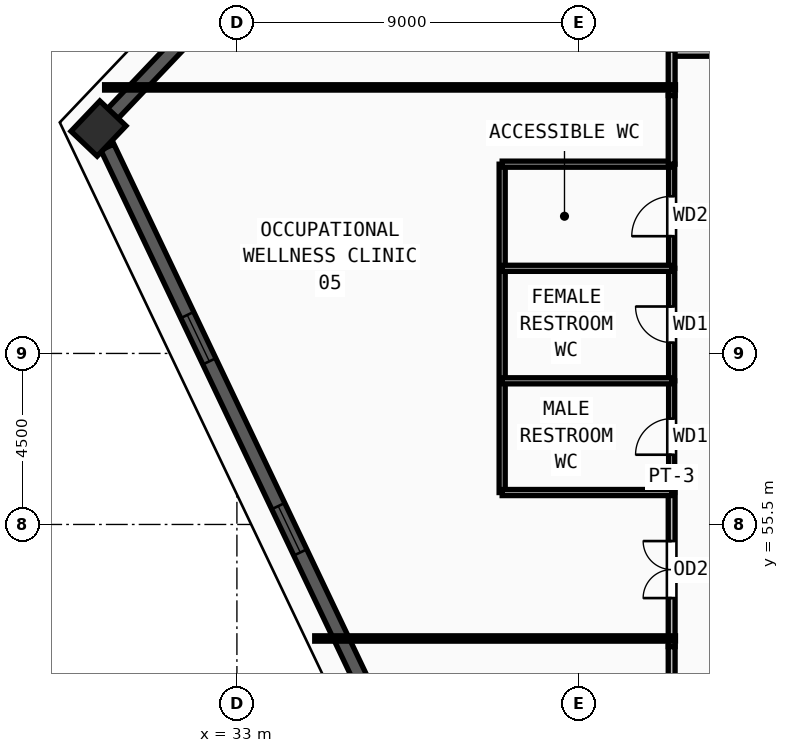
"""IFC4 building model, lengths in metres.
Left out: names, types, materials, properties, quantities, classifications, styles, units other than length and angle.
Written with IfcOpenShell. Run it as: python <this file> out.ifc"""

import sys

from ifc_helpers import new_model, si_unit, direction, frame, frame_2d, origin, origin_2d, place, context, subcontext, project, spatial, rectangle, extrude, source, transform, mapped, element, fill, save


model = new_model("IFC4")
c1 = context("Model", 3, precision=1e-05, world=origin(), true_north=direction((0.0, 1.0)))
c2 = subcontext(c1, "Body", "Model", "MODEL_VIEW")
j1 = project(units=[si_unit("LENGTHUNIT", "METRE"), si_unit("PLANEANGLEUNIT", "RADIAN")], contexts=[c1])
p1 = place(None, origin())
s1 = spatial("IfcSite", under=j1, at=p1, CompositionType="ELEMENT")
p2 = place(p1, origin())
s2 = spatial("IfcBuilding", under=s1, at=p2, CompositionType="ELEMENT")
p3 = place(p2, frame((0.0, 0.0, 286.5)))
s3 = spatial("IfcBuildingStorey", under=s2, at=p3, CompositionType="ELEMENT", Elevation=286.5)
m1 = source(origin(), c2, "Body", "SweptSolid", [
    extrude(rectangle(XDim=1.1, YDim=0.95, at=origin_2d()), origin(), (0.0, 0.0, 1.0), 3.75),
])
p4 = place(p3, frame((29.358, 65.917, 0.0), z_axis=(0.0, 0.0, 1.0), x_axis=(0.68936671806, 0.724412539946, 0.0)))
e1 = element("IfcColumn", 1, at=p4, inside=s3, PredefinedType="COLUMN", context=c2, shape_type="MappedRepresentation", body=[
    mapped(m1, transform((0.0, 0.0, 0.0), x_axis=(1.0, 0.0, 0.0), y_axis=(0.0, 1.0, 0.0), z_axis=(0.0, 0.0, 1.0), scale=1.0)),
])
p5 = place(p3, frame((32.532, 69.253, 0.0), z_axis=(0.0, 0.0, 1.0), x_axis=(-0.689320656659, -0.724456370186, 0.0)))
e2 = element("IfcWall", 2, at=p5, inside=s3, PredefinedType="SOLIDWALL", context=c2, shape_type="SweptSolid", body=[
    extrude(rectangle(XDim=4.065, YDim=0.38, at=frame_2d((2.032, 0.0))), origin(), (0.0, 0.0, 1.0), 3.57),
])
p6 = place(p3, frame((29.59, 65.429, 0.0), z_axis=(0.0, 0.0, 1.0), x_axis=(0.429890605998, -0.902880981567, 0.0)))
e3 = element("IfcWall", 3, at=p6, inside=s3, PredefinedType="SOLIDWALL", context=c2, shape_type="SweptSolid", body=[
    extrude(rectangle(XDim=22.273, YDim=0.38, at=frame_2d((11.136, 0.0))), origin(), (0.0, 0.0, 1.0), 3.57),
])
m2 = source(origin(), c2, "Body", "SweptSolid", [
    extrude(rectangle(XDim=1.35, YDim=1.85, at=frame_2d((0.675, 0.925))), frame((0.0, 0.2, 0.0), z_axis=(0.0, -1.0, 0.0), x_axis=(1.0, 0.0, 0.0)), (0.0, 0.0, 1.0), 0.4),
])
p7 = place(p6, frame((4.893, 0.0, 0.55)))
e4 = element("IfcOpeningElement", 4, at=p7, cuts=e3, PredefinedType="OPENING", context=c2, shape_type="MappedRepresentation", body=[
    mapped(m2, transform((0.0, 0.0, 0.0), x_axis=(1.0, 0.0, 0.0), y_axis=(0.0, 1.0, 0.0), z_axis=(0.0, 0.0, 1.0), scale=1.0)),
])
p8 = place(p6, frame((10.462, 0.0, 0.55)))
e5 = element("IfcOpeningElement", 5, at=p8, cuts=e3, PredefinedType="OPENING", context=c2, shape_type="MappedRepresentation", body=[
    mapped(m2, transform((0.0, 0.0, 0.0), x_axis=(1.0, 0.0, 0.0), y_axis=(0.0, 1.0, 0.0), z_axis=(0.0, 0.0, 1.0), scale=1.0)),
])
p9 = place(p6, frame((16.03, 0.0, 0.55)))
e6 = element("IfcOpeningElement", 6, at=p9, cuts=e3, PredefinedType="OPENING", context=c2, shape_type="MappedRepresentation", body=[
    mapped(m2, transform((0.0, 0.0, 0.0), x_axis=(1.0, 0.0, 0.0), y_axis=(0.0, 1.0, 0.0), z_axis=(0.0, 0.0, 1.0), scale=1.0)),
])
p10 = place(p3, frame((44.44, 56.34, 0.0), z_axis=(0.0, 0.0, 1.0), x_axis=(0.0, 1.0, 0.0)))
e7 = element("IfcWall", 7, at=p10, inside=s3, PredefinedType="PARTITIONING", context=c2, shape_type="SweptSolid", body=[
    extrude(rectangle(XDim=2.94, YDim=0.16, at=frame_2d((1.47, 0.0))), origin(), (0.0, 0.0, 1.0), 3.57),
])
m3 = source(origin(), c2, "Body", "SweptSolid", [
    extrude(rectangle(XDim=0.95, YDim=2.15, at=frame_2d((0.475, 1.075))), frame((0.0, 0.09, 0.0), z_axis=(0.0, -1.0, 0.0), x_axis=(1.0, 0.0, 0.0)), (0.0, 0.0, 1.0), 0.18),
])
p11 = place(p10, frame((0.995, 0.0, 0.0)))
e8 = element("IfcOpeningElement", 8, at=p11, cuts=e7, PredefinedType="OPENING", context=c2, shape_type="MappedRepresentation", body=[
    mapped(m3, transform((0.0, 0.0, 0.0), x_axis=(1.0, 0.0, 0.0), y_axis=(0.0, 1.0, 0.0), z_axis=(0.0, 0.0, 1.0), scale=1.0)),
])
p12 = place(p3, frame((44.44, 59.28, 0.0), z_axis=(0.0, 0.0, 1.0), x_axis=(0.0, 1.0, 0.0)))
e9 = element("IfcWall", 9, at=p12, inside=s3, PredefinedType="PARTITIONING", context=c2, shape_type="SweptSolid", body=[
    extrude(rectangle(XDim=2.96, YDim=0.16, at=frame_2d((1.48, 0.0))), origin(), (0.0, 0.0, 1.0), 3.57),
])
p13 = place(p12, frame((1.005, 0.0, 0.0)))
e10 = element("IfcOpeningElement", 10, at=p13, cuts=e9, PredefinedType="OPENING", context=c2, shape_type="MappedRepresentation", body=[
    mapped(m3, transform((0.0, 0.0, 0.0), x_axis=(1.0, 0.0, 0.0), y_axis=(0.0, 1.0, 0.0), z_axis=(0.0, 0.0, 1.0), scale=1.0)),
])
p14 = place(p3, frame((44.44, 62.24, 0.0), z_axis=(0.0, 0.0, 1.0), x_axis=(0.0, 1.0, 0.0)))
e11 = element("IfcWall", 11, at=p14, inside=s3, PredefinedType="PARTITIONING", context=c2, shape_type="SweptSolid", body=[
    extrude(rectangle(XDim=2.74, YDim=0.16, at=frame_2d((1.37, 0.0))), origin(), (0.0, 0.0, 1.0), 3.57),
])
m4 = source(origin(), c2, "Body", "SweptSolid", [
    extrude(rectangle(XDim=1.05, YDim=2.15, at=frame_2d((0.525, 1.075))), frame((0.0, 0.09, 0.0), z_axis=(0.0, -1.0, 0.0), x_axis=(1.0, 0.0, 0.0)), (0.0, 0.0, 1.0), 0.18),
])
p15 = place(p14, frame((0.845, 0.0, 0.0)))
e12 = element("IfcOpeningElement", 12, at=p15, cuts=e11, PredefinedType="OPENING", context=c2, shape_type="MappedRepresentation", body=[
    mapped(m4, transform((0.0, 0.0, 0.0), x_axis=(1.0, 0.0, 0.0), y_axis=(0.0, 1.0, 0.0), z_axis=(0.0, 0.0, 1.0), scale=1.0)),
])
p16 = place(p3, frame((44.44, 52.285, 0.0), z_axis=(0.0, 0.0, 1.0), x_axis=(0.0, 1.0, 0.0)))
e13 = element("IfcWall", 13, at=p16, inside=s3, PredefinedType="PARTITIONING", context=c2, shape_type="SweptSolid", body=[
    extrude(rectangle(XDim=4.055, YDim=0.18, at=frame_2d((2.028, 0.0))), origin(), (0.0, 0.0, 1.0), 3.261),
])
m5 = source(origin(), c2, "Body", "SweptSolid", [
    extrude(rectangle(XDim=1.5, YDim=2.2, at=frame_2d((0.75, 1.1))), frame((0.0, 0.1, 0.0), z_axis=(0.0, -1.0, 0.0), x_axis=(1.0, 0.0, 0.0)), (0.0, 0.0, 1.0), 0.2),
])
p17 = place(p16, frame((1.278, 0.0, 0.0)))
e14 = element("IfcOpeningElement", 14, at=p17, cuts=e13, PredefinedType="OPENING", context=c2, shape_type="MappedRepresentation", body=[
    mapped(m5, transform((0.0, 0.0, 0.0), x_axis=(1.0, 0.0, 0.0), y_axis=(0.0, 1.0, 0.0), z_axis=(0.0, 0.0, 1.0), scale=1.0)),
])
p18 = place(p3, frame((44.44, 44.385, 0.0), z_axis=(0.0, 0.0, 1.0), x_axis=(0.0, 1.0, 0.0)))
e15 = element("IfcWall", 15, at=p18, inside=s3, PredefinedType="PARTITIONING", context=c2, shape_type="SweptSolid", body=[
    extrude(rectangle(XDim=7.9, YDim=0.18, at=frame_2d((3.95, 0.0))), origin(), (0.0, 0.0, 1.0), 3.57),
])
m6 = source(origin(), c2, "Body", "SweptSolid", [
    extrude(rectangle(XDim=1.0, YDim=2.2, at=frame_2d((0.5, 1.1))), frame((0.0, 0.1, 0.0), z_axis=(0.0, -1.0, 0.0), x_axis=(1.0, 0.0, 0.0)), (0.0, 0.0, 1.0), 0.2),
])
p19 = place(p18, frame((3.45, 0.0, 0.0)))
e16 = element("IfcOpeningElement", 16, at=p19, cuts=e15, PredefinedType="OPENING", context=c2, shape_type="MappedRepresentation", body=[
    mapped(m6, transform((0.0, 0.0, 0.0), x_axis=(1.0, 0.0, 0.0), y_axis=(0.0, 1.0, 0.0), z_axis=(0.0, 0.0, 1.0), scale=1.0)),
])
p20 = place(p3, frame((39.98, 56.34, 0.0), z_axis=(0.0, 0.0, 1.0), x_axis=(0.0, 1.0, 0.0)))
e17 = element("IfcWall", 17, at=p20, inside=s3, PredefinedType="PARTITIONING", context=c2, shape_type="SweptSolid", body=[
    extrude(rectangle(XDim=8.64, YDim=0.16, at=frame_2d((4.32, 0.0))), origin(), (0.0, 0.0, 1.0), 3.57),
])
for number, where, z_axis, x_axis in (
    (18, (39.98, 56.34, 0.0), (0.0, 0.0, 1.0), (1.0, 0.0, 0.0)),
    (19, (39.98, 59.28, 0.0), (0.0, 0.0, 1.0), (1.0, 0.0, 0.0)),
    (20, (39.98, 62.24, 0.0), (0.0, 0.0, 1.0), (1.0, 0.0, 0.0)),
    (21, (39.98, 64.98, 0.0), (0.0, 0.0, 1.0), (1.0, 0.0, 0.0)),
):
    element("IfcWall", number, at=place(p3, frame(where, z_axis=z_axis, x_axis=x_axis)), inside=s3, PredefinedType="PARTITIONING", context=c2, shape_type="SweptSolid", body=[
        extrude(rectangle(XDim=4.46, YDim=0.16, at=frame_2d((2.23, 0.0))), origin(), (0.0, 0.0, 1.0), 3.57),
    ])
p21 = place(p3, frame((44.37, 67.91, 0.0), z_axis=(0.0, 0.0, 1.0), x_axis=(1.0, 0.0, 0.0)))
e22 = element("IfcWall", 22, at=p21, inside=s3, PredefinedType="PARTITIONING", context=c2, shape_type="SweptSolid", body=[
    extrude(rectangle(XDim=7.64, YDim=0.18, at=frame_2d((3.82, 0.0))), origin(), (0.0, 0.0, 1.0), 3.57),
])
p22 = place(p3, frame((44.44, 66.785, 0.0), z_axis=(0.0, 0.0, 1.0), x_axis=(0.0, 1.0, 0.0)))
e23 = element("IfcWall", 23, at=p22, inside=s3, PredefinedType="PARTITIONING", context=c2, shape_type="SweptSolid", body=[
    extrude(rectangle(XDim=1.195, YDim=0.18, at=frame_2d((0.598, 0.0))), origin(), (0.0, 0.0, 1.0), 3.57),
])
p23 = place(p3, frame((44.44, 64.98, 0.0), z_axis=(0.0, 0.0, 1.0), x_axis=(0.0, 1.0, 0.0)))
e24 = element("IfcWall", 24, at=p23, inside=s3, PredefinedType="PARTITIONING", context=c2, shape_type="SweptSolid", body=[
    extrude(rectangle(XDim=1.805, YDim=0.18, at=frame_2d((0.902, 0.0))), origin(), (0.0, 0.0, 1.0), 3.57),
])
p24 = place(p3, frame((44.54, 52.5, 0.0), z_axis=(0.0, 0.0, 1.0), x_axis=(-1.0, 0.0, 0.0)))
e25 = element("IfcWall", 25, at=p24, inside=s3, PredefinedType="PARTITIONING", context=c2, shape_type="SweptSolid", body=[
    extrude(rectangle(XDim=9.492, YDim=0.14, at=frame_2d((4.746, 0.0))), origin(), (0.0, 0.0, 1.0), 3.57),
])
p25 = place(p3, frame((44.54, 67.0, 0.0), z_axis=(0.0, 0.0, 1.0), x_axis=(-1.0, 0.0, 0.0)))
e26 = element("IfcWall", 26, at=p25, inside=s3, PredefinedType="PARTITIONING", context=c2, shape_type="SweptSolid", body=[
    extrude(rectangle(XDim=15.021, YDim=0.14, at=frame_2d((7.51, 0.0))), origin(), (0.0, 0.0, 1.0), 3.57),
])
m7 = source(origin(), c2, "Body", "SweptSolid", [
    extrude(rectangle(XDim=1.35, YDim=1.85, at=frame_2d((0.675, 0.925))), frame((0.0, 0.03, 0.0), z_axis=(0.0, -1.0, 0.0), x_axis=(1.0, 0.0, 0.0)), (0.0, 0.0, 1.0), 0.06),
])
p26 = place(p7, origin())
e27 = element("IfcWindow", 27, at=p26, inside=s3, PartitioningType="SINGLE_PANEL", PredefinedType="WINDOW", context=c2, shape_type="MappedRepresentation", body=[
    mapped(m7, transform((0.0, 0.0, 0.0), x_axis=(1.0, 0.0, 0.0), y_axis=(0.0, 1.0, 0.0), z_axis=(0.0, 0.0, 1.0), scale=1.0)),
])
fill(e4, e27)
p27 = place(p8, origin())
e28 = element("IfcWindow", 28, at=p27, inside=s3, PartitioningType="SINGLE_PANEL", PredefinedType="WINDOW", context=c2, shape_type="MappedRepresentation", body=[
    mapped(m7, transform((0.0, 0.0, 0.0), x_axis=(1.0, 0.0, 0.0), y_axis=(0.0, 1.0, 0.0), z_axis=(0.0, 0.0, 1.0), scale=1.0)),
])
fill(e5, e28)
m8 = source(origin(), c2, "Body", "SweptSolid", [
    extrude(rectangle(XDim=0.95, YDim=2.15, at=frame_2d((0.475, 1.075))), frame((0.0, 0.025, 0.0), z_axis=(0.0, -1.0, 0.0), x_axis=(1.0, 0.0, 0.0)), (0.0, 0.0, 1.0), 0.05),
])
p28 = place(p11, origin())
e29 = element("IfcDoor", 29, at=p28, inside=s3, OperationType="SINGLE_SWING_LEFT", PredefinedType="DOOR", context=c2, shape_type="MappedRepresentation", body=[
    mapped(m8, transform((0.0, 0.0, 0.0), x_axis=(1.0, 0.0, 0.0), y_axis=(0.0, 1.0, 0.0), z_axis=(0.0, 0.0, 1.0), scale=1.0)),
])
fill(e8, e29)
p29 = place(p13, origin())
e30 = element("IfcDoor", 30, at=p29, inside=s3, OperationType="SINGLE_SWING_RIGHT", PredefinedType="DOOR", context=c2, shape_type="MappedRepresentation", body=[
    mapped(m8, transform((0.0, 0.0, 0.0), x_axis=(1.0, 0.0, 0.0), y_axis=(0.0, 1.0, 0.0), z_axis=(0.0, 0.0, 1.0), scale=1.0)),
])
fill(e10, e30)
m9 = source(origin(), c2, "Body", "SweptSolid", [
    extrude(rectangle(XDim=1.05, YDim=2.15, at=frame_2d((0.525, 1.075))), frame((0.0, 0.025, 0.0), z_axis=(0.0, -1.0, 0.0), x_axis=(1.0, 0.0, 0.0)), (0.0, 0.0, 1.0), 0.05),
])
p30 = place(p15, origin())
e31 = element("IfcDoor", 31, at=p30, inside=s3, OperationType="SINGLE_SWING_LEFT", PredefinedType="DOOR", context=c2, shape_type="MappedRepresentation", body=[
    mapped(m9, transform((0.0, 0.0, 0.0), x_axis=(1.0, 0.0, 0.0), y_axis=(0.0, 1.0, 0.0), z_axis=(0.0, 0.0, 1.0), scale=1.0)),
])
fill(e12, e31)
m10 = source(origin(), c2, "Body", "SweptSolid", [
    extrude(rectangle(XDim=1.5, YDim=2.2, at=frame_2d((0.75, 1.1))), frame((0.0, 0.025, 0.0), z_axis=(0.0, -1.0, 0.0), x_axis=(1.0, 0.0, 0.0)), (0.0, 0.0, 1.0), 0.05),
])
p31 = place(p17, origin())
e32 = element("IfcDoor", 32, at=p31, inside=s3, OperationType="DOUBLE_DOOR_SINGLE_SWING", PredefinedType="DOOR", context=c2, shape_type="MappedRepresentation", body=[
    mapped(m10, transform((0.0, 0.0, 0.0), x_axis=(1.0, 0.0, 0.0), y_axis=(0.0, 1.0, 0.0), z_axis=(0.0, 0.0, 1.0), scale=1.0)),
])
fill(e14, e32)
save(model, sys.argv[1])
